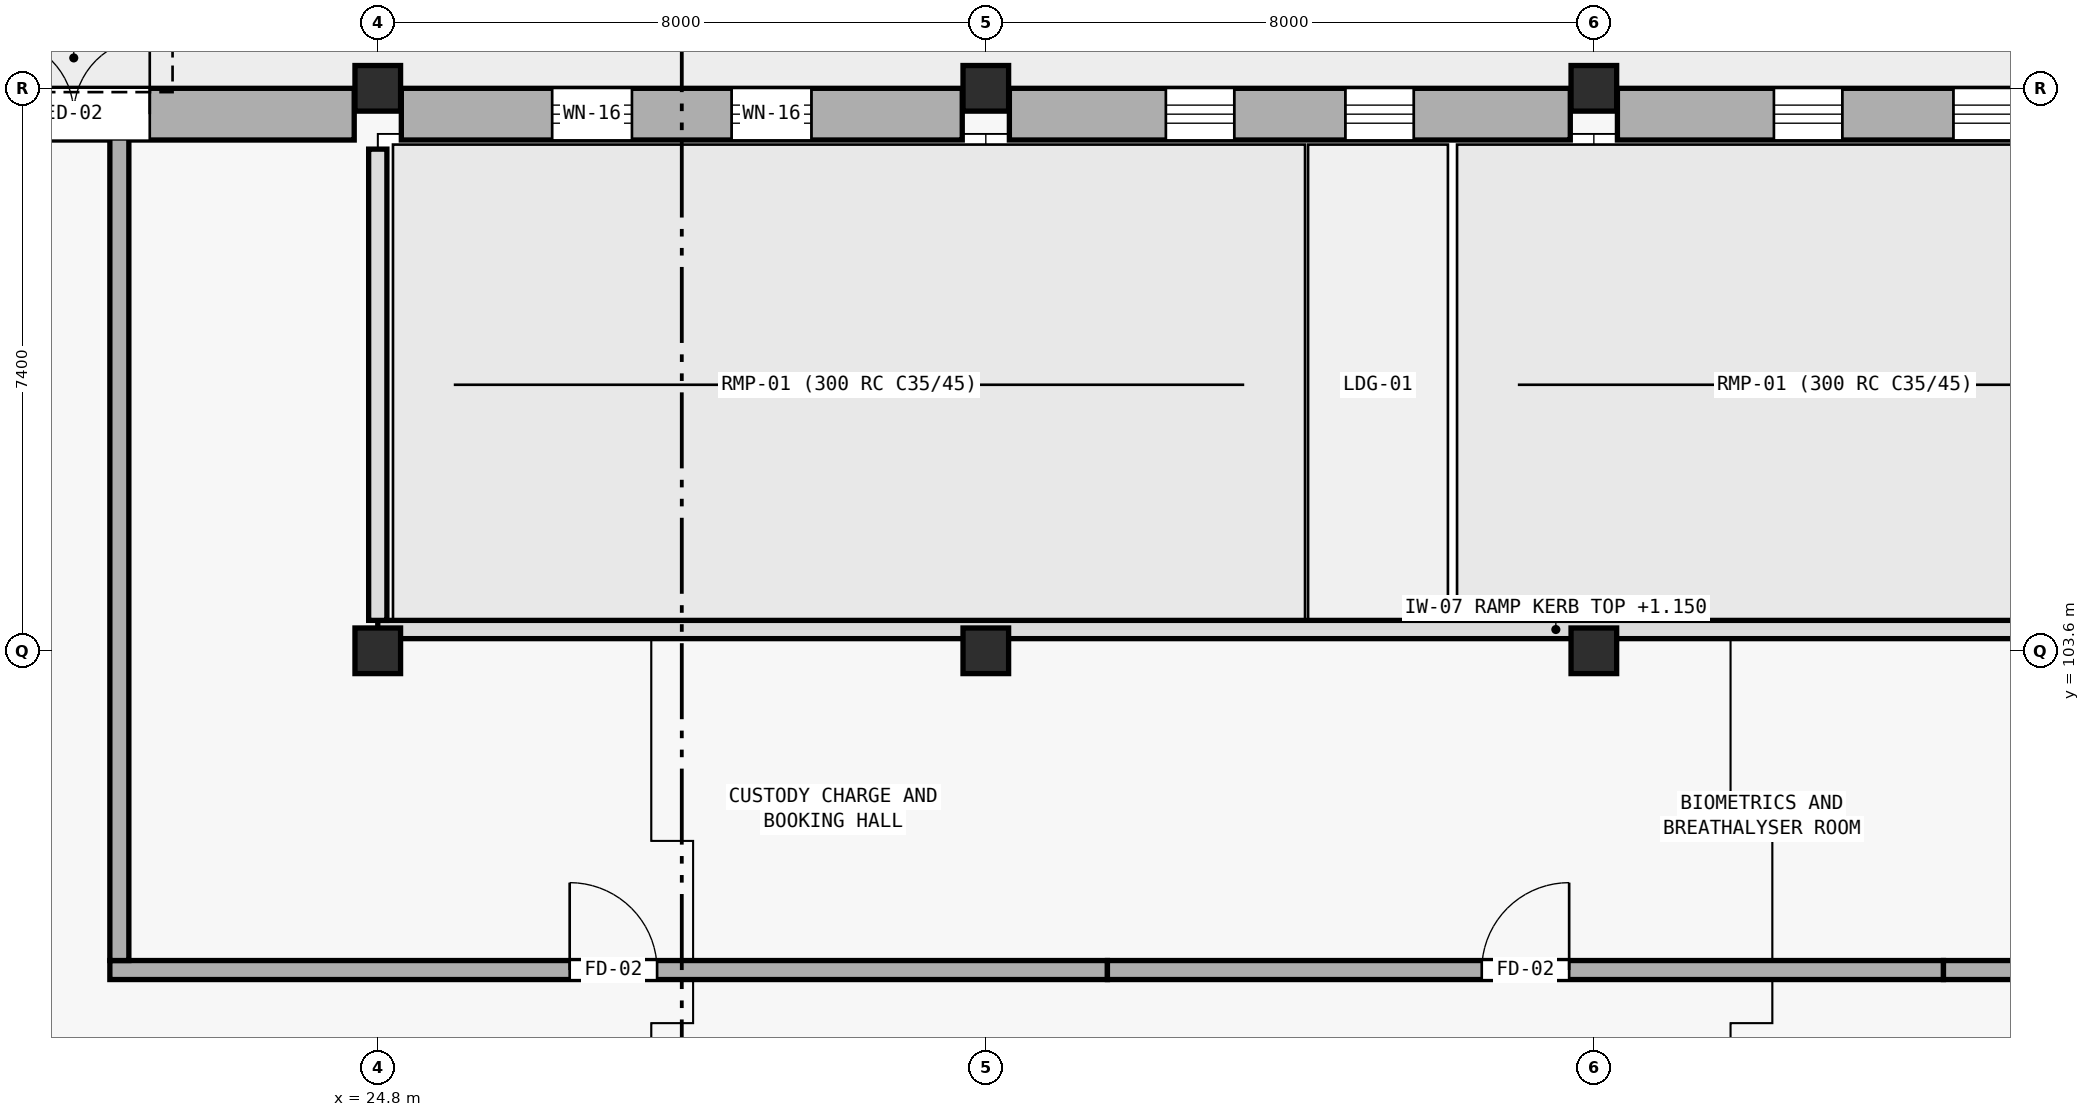
"""IFC4 building model, lengths in metres.
Left out: names, types, materials, properties, quantities, classifications, styles, units other than length and angle.
Written with IfcOpenShell. Run it as: python <this file> out.ifc"""

import sys

from ifc_helpers import new_model, si_unit, direction, frame, frame_2d, origin, origin_2d, place, context, subcontext, project, spatial, rectangle, extrude, element, fill, save


model = new_model("IFC4")
c1 = context("Model", 3, precision=1e-05, world=origin(), true_north=direction((0.0, 1.0)))
c2 = subcontext(c1, "Body", "Model", "MODEL_VIEW")
j1 = project(units=[si_unit("LENGTHUNIT", "METRE"), si_unit("PLANEANGLEUNIT", "RADIAN")], contexts=[c1])
p1 = place(None, origin())
s1 = spatial("IfcSite", under=j1, at=p1, CompositionType="ELEMENT")
p2 = place(p1, origin())
s2 = spatial("IfcBuilding", under=s1, at=p2, CompositionType="ELEMENT")
p3 = place(p2, origin())
s3 = spatial("IfcBuildingStorey", under=s2, at=p3, CompositionType="ELEMENT", Elevation=0.0)
for number, where, z_axis, x_axis in (
    (1, (24.8, 103.6, 0.0), (0.0, 0.0, 1.0), (1.0, 0.0, 0.0)),
    (2, (24.8, 111.0, 0.0), (0.0, 0.0, 1.0), (1.0, 0.0, 0.0)),
    (3, (32.8, 103.6, 0.0), (0.0, 0.0, 1.0), (1.0, 0.0, 0.0)),
    (4, (32.8, 111.0, 0.0), (0.0, 0.0, 1.0), (1.0, 0.0, 0.0)),
    (5, (40.8, 103.6, 0.0), (0.0, 0.0, 1.0), (1.0, 0.0, 0.0)),
    (6, (40.8, 111.0, 0.0), (0.0, 0.0, 1.0), (1.0, 0.0, 0.0)),
):
    element("IfcColumn", number, at=place(p3, frame(where, z_axis=z_axis, x_axis=x_axis)), inside=s3, PredefinedType="COLUMN", context=c2, shape_type="SweptSolid", body=[
        extrude(rectangle(XDim=0.6, YDim=0.6, at=origin_2d()), origin(), (0.0, 0.0, 1.0), 5.4),
    ])
p4 = place(p3, frame((24.8, 103.88, 0.0), z_axis=(0.0, 0.0, 1.0), x_axis=(1.0, 0.0, 0.0)))
e7 = element("IfcWall", 7, at=p4, inside=s3, PredefinedType="PARAPET", context=c2, shape_type="SweptSolid", body=[
    extrude(rectangle(XDim=31.0, YDim=0.24, at=frame_2d((15.5, 0.0))), origin(), (0.0, 0.0, 1.0), 1.15),
])
p5 = place(p3, frame((24.8, 104.0, 0.0), z_axis=(0.0, 0.0, 1.0), x_axis=(0.0, 1.0, 0.0)))
e8 = element("IfcWall", 8, at=p5, inside=s3, PredefinedType="PARAPET", context=c2, shape_type="SweptSolid", body=[
    extrude(rectangle(XDim=6.2, YDim=0.24, at=frame_2d((3.1, 0.0))), origin(), (0.0, 0.0, 1.0), 1.15),
])
p6 = place(p3, frame((16.675, 110.66, 0.0), z_axis=(0.0, 0.0, 1.0), x_axis=(1.0, 0.0, 0.0)))
e9 = element("IfcWall", 9, at=p6, inside=s3, PredefinedType="SOLIDWALL", context=c2, shape_type="SweptSolid", body=[
    extrude(rectangle(XDim=7.815, YDim=0.68, at=frame_2d((3.907, 0.0))), origin(), (0.0, 0.0, 1.0), 5.14),
])
p7 = place(p6, frame((3.125, 0.0, 0.0)))
e10 = element("IfcOpeningElement", 10, at=p7, cuts=e9, PredefinedType="OPENING", context=c2, shape_type="SweptSolid", body=[
    extrude(rectangle(XDim=2.0, YDim=2.35, at=frame_2d((1.0, 1.175))), frame((0.0, 0.35, 0.0), z_axis=(0.0, -1.0, 0.0), x_axis=(1.0, 0.0, 0.0)), (0.0, 0.0, 1.0), 0.7),
])
p8 = place(p3, frame((25.11, 110.66, 0.0), z_axis=(0.0, 0.0, 1.0), x_axis=(1.0, 0.0, 0.0)))
e11 = element("IfcWall", 11, at=p8, inside=s3, PredefinedType="SOLIDWALL", context=c2, shape_type="SweptSolid", body=[
    extrude(rectangle(XDim=7.38, YDim=0.68, at=frame_2d((3.69, 0.0))), origin(), (0.0, 0.0, 1.0), 5.14),
])
p9 = place(p8, frame((1.984, 0.0, 1.8)))
e12 = element("IfcOpeningElement", 12, at=p9, cuts=e11, PredefinedType="OPENING", context=c2, shape_type="SweptSolid", body=[
    extrude(rectangle(XDim=1.05, YDim=1.2, at=frame_2d((0.525, 0.6))), frame((0.0, 0.35, 0.0), z_axis=(0.0, -1.0, 0.0), x_axis=(1.0, 0.0, 0.0)), (0.0, 0.0, 1.0), 0.7),
])
p10 = place(p8, frame((4.346, 0.0, 1.8)))
e13 = element("IfcOpeningElement", 13, at=p10, cuts=e11, PredefinedType="OPENING", context=c2, shape_type="SweptSolid", body=[
    extrude(rectangle(XDim=1.05, YDim=1.2, at=frame_2d((0.525, 0.6))), frame((0.0, 0.35, 0.0), z_axis=(0.0, -1.0, 0.0), x_axis=(1.0, 0.0, 0.0)), (0.0, 0.0, 1.0), 0.7),
])
p11 = place(p3, frame((33.11, 110.66, 0.0), z_axis=(0.0, 0.0, 1.0), x_axis=(1.0, 0.0, 0.0)))
e14 = element("IfcWall", 14, at=p11, inside=s3, PredefinedType="SOLIDWALL", context=c2, shape_type="SweptSolid", body=[
    extrude(rectangle(XDim=7.38, YDim=0.68, at=frame_2d((3.69, 0.0))), origin(), (0.0, 0.0, 1.0), 5.14),
])
p12 = place(p11, frame((2.059, 0.0, 1.8)))
e15 = element("IfcOpeningElement", 15, at=p12, cuts=e14, PredefinedType="OPENING", context=c2, shape_type="SweptSolid", body=[
    extrude(rectangle(XDim=0.9, YDim=0.9, at=frame_2d((0.45, 0.45))), frame((0.0, 0.35, 0.0), z_axis=(0.0, -1.0, 0.0), x_axis=(1.0, 0.0, 0.0)), (0.0, 0.0, 1.0), 0.7),
])
p13 = place(p11, frame((4.421, 0.0, 1.8)))
e16 = element("IfcOpeningElement", 16, at=p13, cuts=e14, PredefinedType="OPENING", context=c2, shape_type="SweptSolid", body=[
    extrude(rectangle(XDim=0.9, YDim=0.9, at=frame_2d((0.45, 0.45))), frame((0.0, 0.35, 0.0), z_axis=(0.0, -1.0, 0.0), x_axis=(1.0, 0.0, 0.0)), (0.0, 0.0, 1.0), 0.7),
])
p14 = place(p3, frame((41.11, 110.66, 0.0), z_axis=(0.0, 0.0, 1.0), x_axis=(1.0, 0.0, 0.0)))
e17 = element("IfcWall", 17, at=p14, inside=s3, PredefinedType="SOLIDWALL", context=c2, shape_type="SweptSolid", body=[
    extrude(rectangle(XDim=7.38, YDim=0.68, at=frame_2d((3.69, 0.0))), origin(), (0.0, 0.0, 1.0), 5.14),
])
p15 = place(p14, frame((2.059, 0.0, 1.8)))
e18 = element("IfcOpeningElement", 18, at=p15, cuts=e17, PredefinedType="OPENING", context=c2, shape_type="SweptSolid", body=[
    extrude(rectangle(XDim=0.9, YDim=1.15, at=frame_2d((0.45, 0.575))), frame((0.0, 0.35, 0.0), z_axis=(0.0, -1.0, 0.0), x_axis=(1.0, 0.0, 0.0)), (0.0, 0.0, 1.0), 0.7),
])
p16 = place(p14, frame((4.421, 0.0, 1.8)))
e19 = element("IfcOpeningElement", 19, at=p16, cuts=e17, PredefinedType="OPENING", context=c2, shape_type="SweptSolid", body=[
    extrude(rectangle(XDim=0.9, YDim=1.15, at=frame_2d((0.45, 0.575))), frame((0.0, 0.35, 0.0), z_axis=(0.0, -1.0, 0.0), x_axis=(1.0, 0.0, 0.0)), (0.0, 0.0, 1.0), 0.7),
])
p17 = place(p3, frame((21.275, 99.4, 0.0), z_axis=(0.0, 0.0, 1.0), x_axis=(1.0, 0.0, 0.0)))
e20 = element("IfcWall", 20, at=p17, inside=s3, PredefinedType="SOLIDWALL", context=c2, shape_type="SweptSolid", body=[
    extrude(rectangle(XDim=13.125, YDim=0.25, at=frame_2d((6.562, 0.0))), origin(), (0.0, 0.0, 1.0), 4.27),
])
p18 = place(p17, frame((6.05, 0.0, 0.0)))
e21 = element("IfcOpeningElement", 21, at=p18, cuts=e20, PredefinedType="OPENING", context=c2, shape_type="SweptSolid", body=[
    extrude(rectangle(XDim=1.15, YDim=2.15, at=frame_2d((0.575, 1.075))), frame((0.0, 0.135, 0.0), z_axis=(0.0, -1.0, 0.0), x_axis=(1.0, 0.0, 0.0)), (0.0, 0.0, 1.0), 0.27),
])
p19 = place(p3, frame((21.4, 99.525, 0.0), z_axis=(0.0, 0.0, 1.0), x_axis=(0.0, 1.0, 0.0)))
e22 = element("IfcWall", 22, at=p19, inside=s3, PredefinedType="SOLIDWALL", context=c2, shape_type="SweptSolid", body=[
    extrude(rectangle(XDim=10.935, YDim=0.25, at=frame_2d((5.468, 0.0))), origin(), (0.0, 0.0, 1.0), 4.27),
])
p20 = place(p3, frame((34.4, 99.4, 0.0), z_axis=(0.0, 0.0, 1.0), x_axis=(1.0, 0.0, 0.0)))
e23 = element("IfcWall", 23, at=p20, inside=s3, PredefinedType="SOLIDWALL", context=c2, shape_type="SweptSolid", body=[
    extrude(rectangle(XDim=11.0, YDim=0.25, at=frame_2d((5.5, 0.0))), origin(), (0.0, 0.0, 1.0), 4.27),
])
p21 = place(p20, frame((4.925, 0.0, 0.0)))
e24 = element("IfcOpeningElement", 24, at=p21, cuts=e23, PredefinedType="OPENING", context=c2, shape_type="SweptSolid", body=[
    extrude(rectangle(XDim=1.15, YDim=2.15, at=frame_2d((0.575, 1.075))), frame((0.0, 0.135, 0.0), z_axis=(0.0, -1.0, 0.0), x_axis=(1.0, 0.0, 0.0)), (0.0, 0.0, 1.0), 0.27),
])
p22 = place(p3, frame((45.4, 99.4, 0.0), z_axis=(0.0, 0.0, 1.0), x_axis=(1.0, 0.0, 0.0)))
e25 = element("IfcWall", 25, at=p22, inside=s3, PredefinedType="SOLIDWALL", context=c2, shape_type="SweptSolid", body=[
    extrude(rectangle(XDim=10.86, YDim=0.25, at=frame_2d((5.43, 0.0))), origin(), (0.0, 0.0, 1.0), 4.27),
])
p23 = place(p22, frame((4.925, 0.0, 0.0)))
e26 = element("IfcOpeningElement", 26, at=p23, cuts=e25, PredefinedType="OPENING", context=c2, shape_type="SweptSolid", body=[
    extrude(rectangle(XDim=1.15, YDim=2.15, at=frame_2d((0.575, 1.075))), frame((0.0, 0.135, 0.0), z_axis=(0.0, -1.0, 0.0), x_axis=(1.0, 0.0, 0.0)), (0.0, 0.0, 1.0), 0.27),
])
p24 = place(p7, origin())
e27 = element("IfcDoor", 27, at=p24, inside=s3, OperationType="DOUBLE_DOOR_SINGLE_SWING", PredefinedType="DOOR", context=c2, shape_type="SweptSolid", body=[
    extrude(rectangle(XDim=2.0, YDim=2.35, at=frame_2d((1.0, 1.175))), frame((0.0, 0.025, 0.0), z_axis=(0.0, -1.0, 0.0), x_axis=(1.0, 0.0, 0.0)), (0.0, 0.0, 1.0), 0.05),
])
fill(e10, e27)
p25 = place(p9, origin())
e28 = element("IfcWindow", 28, at=p25, inside=s3, PartitioningType="SINGLE_PANEL", PredefinedType="WINDOW", context=c2, shape_type="SweptSolid", body=[
    extrude(rectangle(XDim=1.05, YDim=1.2, at=frame_2d((0.525, 0.6))), frame((0.0, 0.03, 0.0), z_axis=(0.0, -1.0, 0.0), x_axis=(1.0, 0.0, 0.0)), (0.0, 0.0, 1.0), 0.06),
])
fill(e12, e28)
p26 = place(p10, origin())
e29 = element("IfcWindow", 29, at=p26, inside=s3, PartitioningType="SINGLE_PANEL", PredefinedType="WINDOW", context=c2, shape_type="SweptSolid", body=[
    extrude(rectangle(XDim=1.05, YDim=1.2, at=frame_2d((0.525, 0.6))), frame((0.0, 0.03, 0.0), z_axis=(0.0, -1.0, 0.0), x_axis=(1.0, 0.0, 0.0)), (0.0, 0.0, 1.0), 0.06),
])
fill(e13, e29)
p27 = place(p12, origin())
e30 = element("IfcWindow", 30, at=p27, inside=s3, PartitioningType="SINGLE_PANEL", PredefinedType="WINDOW", context=c2, shape_type="SweptSolid", body=[
    extrude(rectangle(XDim=0.9, YDim=0.9, at=frame_2d((0.45, 0.45))), frame((0.0, 0.03, 0.0), z_axis=(0.0, -1.0, 0.0), x_axis=(1.0, 0.0, 0.0)), (0.0, 0.0, 1.0), 0.06),
])
fill(e15, e30)
p28 = place(p13, origin())
e31 = element("IfcWindow", 31, at=p28, inside=s3, PartitioningType="SINGLE_PANEL", PredefinedType="WINDOW", context=c2, shape_type="SweptSolid", body=[
    extrude(rectangle(XDim=0.9, YDim=0.9, at=frame_2d((0.45, 0.45))), frame((0.0, 0.03, 0.0), z_axis=(0.0, -1.0, 0.0), x_axis=(1.0, 0.0, 0.0)), (0.0, 0.0, 1.0), 0.06),
])
fill(e16, e31)
p29 = place(p15, origin())
e32 = element("IfcWindow", 32, at=p29, inside=s3, PartitioningType="SINGLE_PANEL", PredefinedType="WINDOW", context=c2, shape_type="SweptSolid", body=[
    extrude(rectangle(XDim=0.9, YDim=1.15, at=frame_2d((0.45, 0.575))), frame((0.0, 0.03, 0.0), z_axis=(0.0, -1.0, 0.0), x_axis=(1.0, 0.0, 0.0)), (0.0, 0.0, 1.0), 0.06),
])
fill(e18, e32)
p30 = place(p16, origin())
e33 = element("IfcWindow", 33, at=p30, inside=s3, PartitioningType="SINGLE_PANEL", PredefinedType="WINDOW", context=c2, shape_type="SweptSolid", body=[
    extrude(rectangle(XDim=0.9, YDim=1.15, at=frame_2d((0.45, 0.575))), frame((0.0, 0.03, 0.0), z_axis=(0.0, -1.0, 0.0), x_axis=(1.0, 0.0, 0.0)), (0.0, 0.0, 1.0), 0.06),
])
fill(e19, e33)
p31 = place(p18, origin())
e34 = element("IfcDoor", 34, at=p31, inside=s3, OperationType="SINGLE_SWING_LEFT", PredefinedType="DOOR", context=c2, shape_type="SweptSolid", body=[
    extrude(rectangle(XDim=1.15, YDim=2.15, at=frame_2d((0.575, 1.075))), frame((0.0, 0.025, 0.0), z_axis=(0.0, -1.0, 0.0), x_axis=(1.0, 0.0, 0.0)), (0.0, 0.0, 1.0), 0.05),
])
fill(e21, e34)
p32 = place(p21, origin())
e35 = element("IfcDoor", 35, at=p32, inside=s3, OperationType="SINGLE_SWING_RIGHT", PredefinedType="DOOR", context=c2, shape_type="SweptSolid", body=[
    extrude(rectangle(XDim=1.15, YDim=2.15, at=frame_2d((0.575, 1.075))), frame((0.0, 0.025, 0.0), z_axis=(0.0, -1.0, 0.0), x_axis=(1.0, 0.0, 0.0)), (0.0, 0.0, 1.0), 0.05),
])
fill(e24, e35)
save(model, sys.argv[1])
